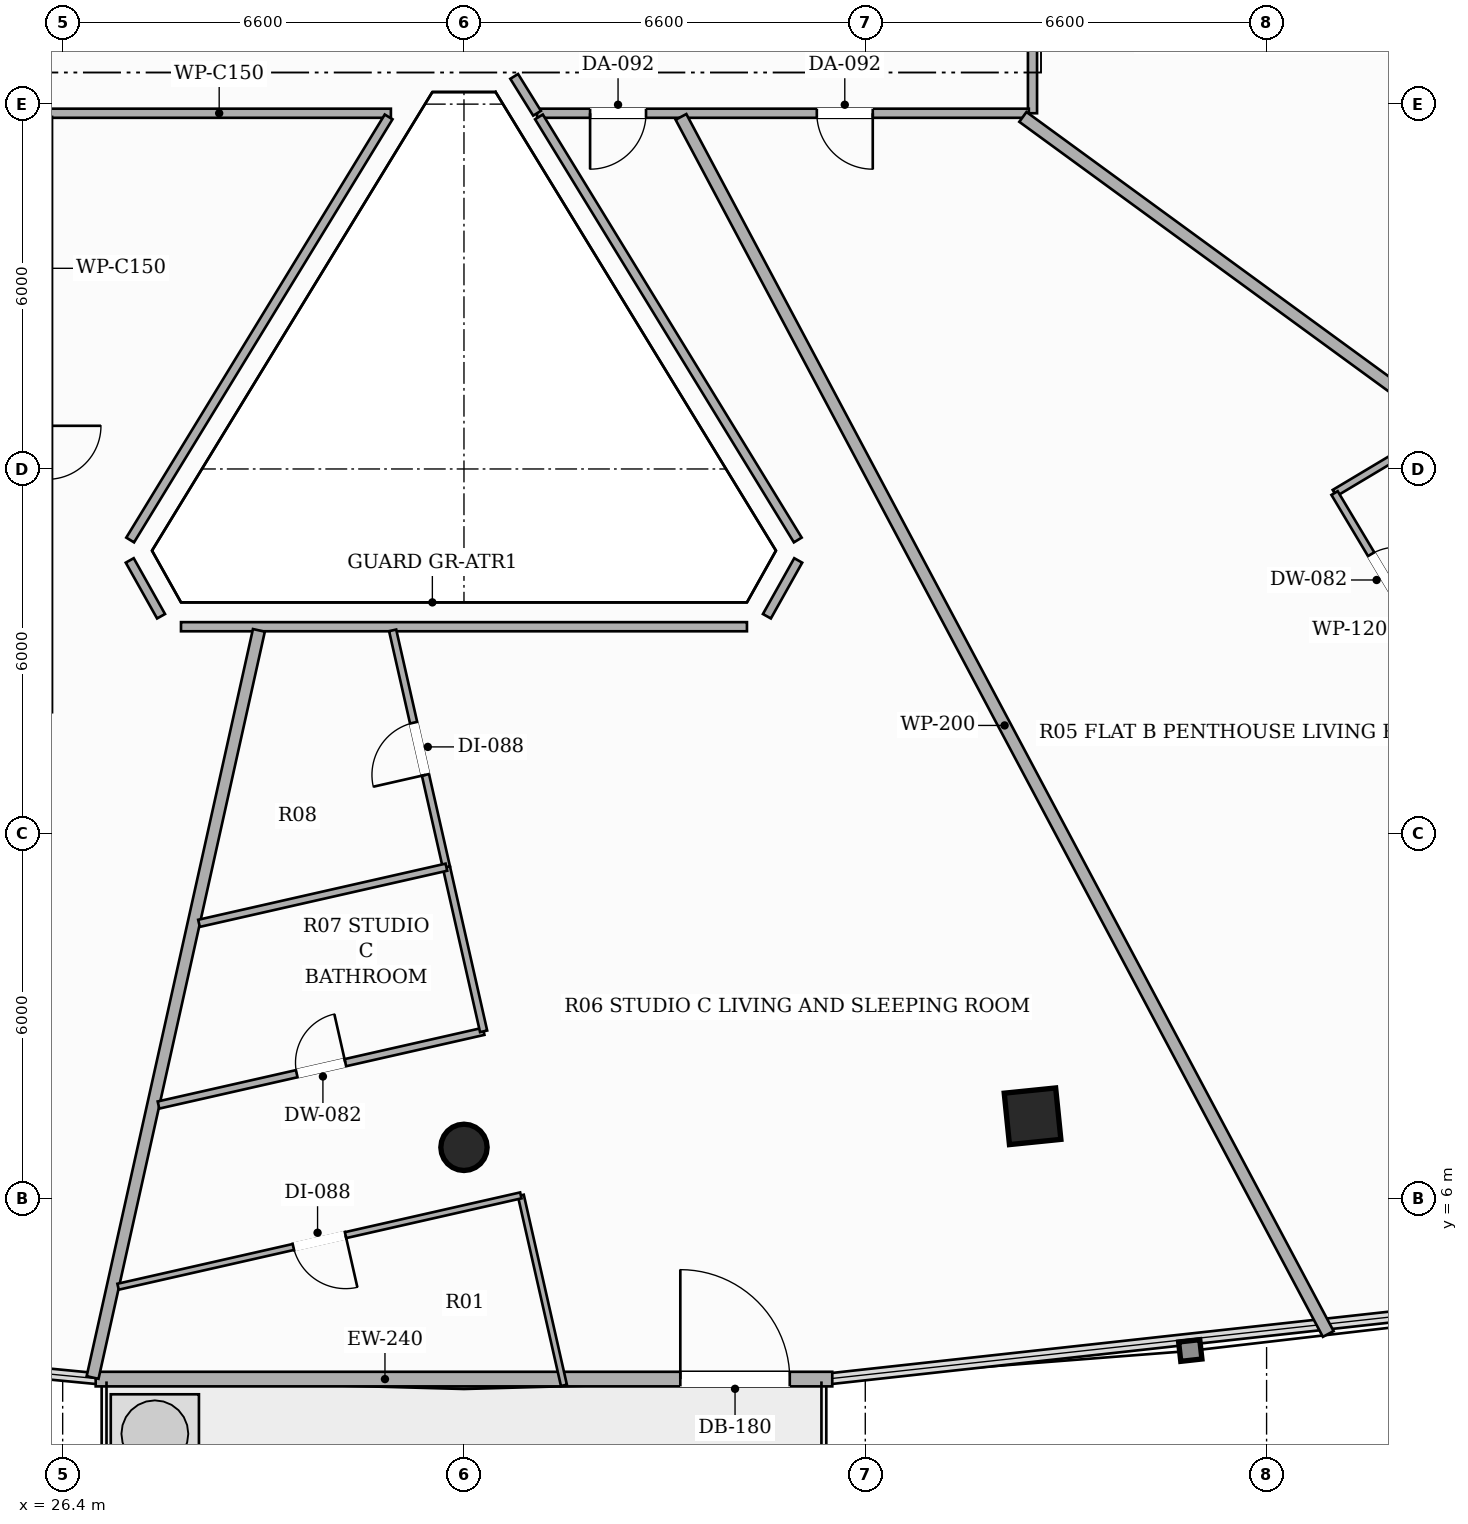
"""IFC4 building model, lengths in metres.
Left out: names, types, materials, properties, quantities, classifications, styles, units other than length and angle.
Written with IfcOpenShell. Run it as: python <this file> out.ifc"""

import sys

from ifc_helpers import new_model, si_unit, direction, frame, frame_2d, origin, origin_2d, place, context, subcontext, project, spatial, rectangle, hollow_rectangle, hollow_circle, extrude, element, fill, save


model = new_model("IFC4")
c1 = context("Model", 3, precision=1e-05, world=origin(), true_north=direction((0.0, 1.0)))
c2 = subcontext(c1, "Body", "Model", "MODEL_VIEW")
j1 = project(units=[si_unit("LENGTHUNIT", "METRE"), si_unit("PLANEANGLEUNIT", "RADIAN")], contexts=[c1])
p1 = place(None, origin())
s1 = spatial("IfcSite", under=j1, at=p1, CompositionType="ELEMENT")
p2 = place(p1, origin())
s2 = spatial("IfcBuilding", under=s1, at=p2, CompositionType="ELEMENT")
p3 = place(p2, frame((0.0, 0.0, 119.9)))
s3 = spatial("IfcBuildingStorey", under=s2, at=p3, CompositionType="ELEMENT", Elevation=119.9)
p4 = place(p3, frame((33.0, 6.844, 0.0), z_axis=(0.0, 0.0, 1.0), x_axis=(1.0, 0.0, 0.0)))
e1 = element("IfcColumn", 1, at=p4, inside=s3, PredefinedType="COLUMN", context=c2, shape_type="SweptSolid", body=[
    extrude(hollow_circle(Radius=0.381, WallThickness=0.022, at=origin_2d()), origin(), (0.0, 0.0, 1.0), 3.3),
])
p5 = place(p3, frame((42.351, 7.355, 0.0), z_axis=(0.0, 0.0, 1.0), x_axis=(0.994880708829, 0.101056297183, 0.0)))
e2 = element("IfcColumn", 2, at=p5, inside=s3, PredefinedType="COLUMN", context=c2, shape_type="SweptSolid", body=[
    extrude(hollow_rectangle(XDim=0.85, YDim=0.85, WallThickness=0.028, at=origin_2d()), origin(), (0.0, 0.0, 1.0), 3.3),
])
p6 = place(p3, frame((26.943, 3.033, 0.0), z_axis=(0.0, 0.0, 1.0), x_axis=(1.0, 0.0, 0.0)))
e3 = element("IfcWall", 3, at=p6, inside=s3, PredefinedType="SOLIDWALL", context=c2, shape_type="SweptSolid", body=[
    extrude(rectangle(XDim=12.114, YDim=0.24, at=frame_2d((6.057, 0.0))), origin(), (0.0, 0.0, 1.0), 2.624),
])
p7 = place(p6, frame((9.615, 0.0, 0.0)))
e4 = element("IfcOpeningElement", 4, at=p7, cuts=e3, PredefinedType="OPENING", context=c2, shape_type="SweptSolid", body=[
    extrude(rectangle(XDim=1.8, YDim=2.2, at=frame_2d((0.9, 1.1))), frame((0.0, 0.13, 0.0), z_axis=(0.0, -1.0, 0.0), x_axis=(1.0, 0.0, 0.0)), (0.0, 0.0, 1.0), 0.26),
])
p8 = place(p3, frame((31.798, 23.85, 0.0), z_axis=(0.0, 0.0, 1.0), x_axis=(-1.0, 0.0, 0.0)))
e5 = element("IfcWall", 5, at=p8, inside=s3, PredefinedType="PARTITIONING", context=c2, shape_type="SweptSolid", body=[
    extrude(rectangle(XDim=5.648, YDim=0.15, at=frame_2d((2.824, 0.0))), origin(), (0.0, 0.0, 1.0), 2.721),
])
p9 = place(p3, frame((26.15, 23.79, 0.0), z_axis=(0.0, 0.0, 1.0), x_axis=(0.0, -1.0, 0.0)))
e6 = element("IfcWall", 6, at=p9, inside=s3, PredefinedType="PARTITIONING", context=c2, shape_type="SweptSolid", body=[
    extrude(rectangle(XDim=9.79, YDim=0.15, at=frame_2d((4.895, 0.0))), origin(), (0.0, 0.0, 1.0), 2.721),
])
p10 = place(p9, frame((5.08, 0.0, 0.0)))
e7 = element("IfcOpeningElement", 7, at=p10, cuts=e6, PredefinedType="OPENING", context=c2, shape_type="SweptSolid", body=[
    extrude(rectangle(XDim=0.88, YDim=2.1, at=frame_2d((0.44, 1.05))), frame((0.0, 0.085, 0.0), z_axis=(0.0, -1.0, 0.0), x_axis=(1.0, 0.0, 0.0)), (0.0, 0.0, 1.0), 0.17),
])
p11 = place(p3, frame((42.35, 28.34, 0.0), z_axis=(0.0, 0.0, 1.0), x_axis=(0.0, -1.0, 0.0)))
e8 = element("IfcWall", 8, at=p11, inside=s3, PredefinedType="PARTITIONING", context=c2, shape_type="SweptSolid", body=[
    extrude(rectangle(XDim=4.49, YDim=0.15, at=frame_2d((2.245, 0.0))), origin(), (0.0, 0.0, 1.0), 2.721),
])
p12 = place(p11, frame((1.805, 0.0, 0.0)))
e9 = element("IfcOpeningElement", 9, at=p12, cuts=e8, PredefinedType="OPENING", context=c2, shape_type="SweptSolid", body=[
    extrude(rectangle(XDim=0.88, YDim=2.1, at=frame_2d((0.44, 1.05))), frame((0.0, 0.085, 0.0), z_axis=(0.0, -1.0, 0.0), x_axis=(1.0, 0.0, 0.0)), (0.0, 0.0, 1.0), 0.17),
])
p13 = place(p3, frame((42.29, 23.85, 0.0), z_axis=(0.0, 0.0, 1.0), x_axis=(-1.0, 0.0, 0.0)))
e10 = element("IfcWall", 10, at=p13, inside=s3, PredefinedType="PARTITIONING", context=c2, shape_type="SweptSolid", body=[
    extrude(rectangle(XDim=8.088, YDim=0.15, at=frame_2d((4.044, 0.0))), origin(), (0.0, 0.0, 1.0), 2.492),
])
p14 = place(p13, frame((2.567, 0.0, 0.0)))
e11 = element("IfcOpeningElement", 11, at=p14, cuts=e10, PredefinedType="OPENING", context=c2, shape_type="SweptSolid", body=[
    extrude(rectangle(XDim=0.92, YDim=2.15, at=frame_2d((0.46, 1.075))), frame((0.0, 0.085, 0.0), z_axis=(0.0, -1.0, 0.0), x_axis=(1.0, 0.0, 0.0)), (0.0, 0.0, 1.0), 0.17),
])
p15 = place(p13, frame((6.296, 0.0, 0.0)))
e12 = element("IfcOpeningElement", 12, at=p15, cuts=e10, PredefinedType="OPENING", context=c2, shape_type="SweptSolid", body=[
    extrude(rectangle(XDim=0.92, YDim=2.15, at=frame_2d((0.46, 1.075))), frame((0.0, 0.085, 0.0), z_axis=(0.0, -1.0, 0.0), x_axis=(1.0, 0.0, 0.0)), (0.0, 0.0, 1.0), 0.17),
])
p16 = place(p3, frame((34.202, 23.85, 0.0), z_axis=(0.0, 0.0, 1.0), x_axis=(-0.527226500772, 0.849724788907, 0.0)))
e13 = element("IfcWall", 13, at=p16, inside=s3, PredefinedType="PARTITIONING", context=c2, shape_type="SweptSolid", body=[
    extrude(rectangle(XDim=0.713, YDim=0.15, at=frame_2d((0.356, 0.0))), origin(), (0.0, 0.0, 1.0), 3.06),
])
p17 = place(p3, frame((34.233, 23.79, 0.0), z_axis=(0.0, 0.0, 1.0), x_axis=(0.521893040745, -0.853010934292, 0.0)))
e14 = element("IfcWall", 14, at=p17, inside=s3, PredefinedType="PARTITIONING", context=c2, shape_type="SweptSolid", body=[
    extrude(rectangle(XDim=8.157, YDim=0.15, at=frame_2d((4.079, 0.0))), origin(), (0.0, 0.0, 1.0), 2.721),
])
p18 = place(p3, frame((38.497, 16.496, 0.0), z_axis=(0.0, 0.0, 1.0), x_axis=(-0.489281087794, -0.872126147485, 0.0)))
e15 = element("IfcWall", 15, at=p18, inside=s3, PredefinedType="PARTITIONING", context=c2, shape_type="SweptSolid", body=[
    extrude(rectangle(XDim=1.053, YDim=0.15, at=frame_2d((0.526, 0.0))), origin(), (0.0, 0.0, 1.0), 3.06),
])
p19 = place(p3, frame((37.654, 15.406, 0.0), z_axis=(0.0, 0.0, 1.0), x_axis=(-1.0, 0.0, 0.0)))
e16 = element("IfcWall", 16, at=p19, inside=s3, PredefinedType="PARTITIONING", context=c2, shape_type="SweptSolid", body=[
    extrude(rectangle(XDim=9.308, YDim=0.15, at=frame_2d((4.654, 0.0))), origin(), (0.0, 0.0, 1.0), 2.721),
])
p20 = place(p3, frame((28.018, 15.578, 0.0), z_axis=(0.0, 0.0, 1.0), x_axis=(-0.489281087794, 0.872126147485, 0.0)))
e17 = element("IfcWall", 17, at=p20, inside=s3, PredefinedType="PARTITIONING", context=c2, shape_type="SweptSolid", body=[
    extrude(rectangle(XDim=1.053, YDim=0.15, at=frame_2d((0.526, 0.0))), origin(), (0.0, 0.0, 1.0), 3.06),
])
p21 = place(p3, frame((27.51, 16.832, 0.0), z_axis=(0.0, 0.0, 1.0), x_axis=(0.521348270591, 0.853343999072, 0.0)))
e18 = element("IfcWall", 18, at=p21, inside=s3, PredefinedType="PARTITIONING", context=c2, shape_type="SweptSolid", body=[
    extrude(rectangle(XDim=8.154, YDim=0.15, at=frame_2d((4.077, 0.0))), origin(), (0.0, 0.0, 1.0), 2.721),
])
p22 = place(p3, frame((47.214, 3.775, 0.0), z_axis=(0.0, 0.0, 1.0), x_axis=(-0.469567249912, 0.88289670846, 0.0)))
e19 = element("IfcWall", 19, at=p22, inside=s3, PredefinedType="PARTITIONING", context=c2, shape_type="SweptSolid", body=[
    extrude(rectangle(XDim=22.67, YDim=0.2, at=frame_2d((11.335, 0.0))), origin(), (0.0, 0.0, 1.0), 2.413),
])
p23 = place(p3, frame((42.192, 23.79, 0.0), z_axis=(0.0, 0.0, 1.0), x_axis=(0.807710254014, -0.589579634621, 0.0)))
e20 = element("IfcWall", 20, at=p23, inside=s3, PredefinedType="PARTITIONING", context=c2, shape_type="SweptSolid", body=[
    extrude(rectangle(XDim=18.691, YDim=0.2, at=frame_2d((9.346, 0.0))), origin(), (0.0, 0.0, 1.0), 2.413),
])
p24 = place(p3, frame((26.892, 3.059, 0.0), z_axis=(0.0, 0.0, 1.0), x_axis=(0.217267240277, 0.97611215867, 0.0)))
e21 = element("IfcWall", 21, at=p24, inside=s3, PredefinedType="PARTITIONING", context=c2, shape_type="SweptSolid", body=[
    extrude(rectangle(XDim=12.588, YDim=0.2, at=frame_2d((6.294, 0.0))), origin(), (0.0, 0.0, 1.0), 2.413),
])
p25 = place(p3, frame((49.08, 18.657, 0.0), z_axis=(0.0, 0.0, 1.0), x_axis=(-0.858394155401, -0.51299071529, 0.0)))
e22 = element("IfcWall", 22, at=p25, inside=s3, PredefinedType="PARTITIONING", context=c2, shape_type="SweptSolid", body=[
    extrude(rectangle(XDim=2.053, YDim=0.12, at=frame_2d((1.026, 0.0))), origin(), (0.0, 0.0, 1.0), 2.721),
])
p26 = place(p3, frame((47.318, 17.604, 0.0), z_axis=(0.0, 0.0, 1.0), x_axis=(0.51313361254, -0.858308741469, 0.0)))
e23 = element("IfcWall", 23, at=p26, inside=s3, PredefinedType="PARTITIONING", context=c2, shape_type="SweptSolid", body=[
    extrude(rectangle(XDim=3.165, YDim=0.12, at=frame_2d((1.582, 0.0))), origin(), (0.0, 0.0, 1.0), 2.492),
])
p27 = place(p26, frame((1.172, 0.0, 0.0)))
e24 = element("IfcOpeningElement", 24, at=p27, cuts=e23, PredefinedType="OPENING", context=c2, shape_type="SweptSolid", body=[
    extrude(rectangle(XDim=0.82, YDim=2.1, at=frame_2d((0.41, 1.05))), frame((0.0, 0.07, 0.0), z_axis=(0.0, -1.0, 0.0), x_axis=(1.0, 0.0, 0.0)), (0.0, 0.0, 1.0), 0.14),
])
p28 = place(p3, frame((27.976, 7.54, 0.0), z_axis=(0.0, 0.0, 1.0), x_axis=(0.975262605336, 0.221049430295, 0.0)))
e25 = element("IfcWall", 25, at=p28, inside=s3, PredefinedType="PARTITIONING", context=c2, shape_type="SweptSolid", body=[
    extrude(rectangle(XDim=5.483, YDim=0.12, at=frame_2d((2.741, 0.0))), origin(), (0.0, 0.0, 1.0), 2.413),
])
p29 = place(p28, frame((2.331, 0.0, 0.0)))
e26 = element("IfcOpeningElement", 26, at=p29, cuts=e25, PredefinedType="OPENING", context=c2, shape_type="SweptSolid", body=[
    extrude(rectangle(XDim=0.82, YDim=2.1, at=frame_2d((0.41, 1.05))), frame((0.0, 0.07, 0.0), z_axis=(0.0, -1.0, 0.0), x_axis=(1.0, 0.0, 0.0)), (0.0, 0.0, 1.0), 0.14),
])
p30 = place(p3, frame((33.323, 8.752, 0.0), z_axis=(0.0, 0.0, 1.0), x_axis=(-0.221159716637, 0.975237601683, 0.0)))
e27 = element("IfcWall", 27, at=p30, inside=s3, PredefinedType="PARTITIONING", context=c2, shape_type="SweptSolid", body=[
    extrude(rectangle(XDim=2.768, YDim=0.12, at=frame_2d((1.384, 0.0))), origin(), (0.0, 0.0, 1.0), 2.721),
])
p31 = place(p3, frame((32.711, 11.451, 0.0), z_axis=(0.0, 0.0, 1.0), x_axis=(-0.221335761288, 0.975197662413, 0.0)))
e28 = element("IfcWall", 28, at=p31, inside=s3, PredefinedType="PARTITIONING", context=c2, shape_type="SweptSolid", body=[
    extrude(rectangle(XDim=3.994, YDim=0.12, at=frame_2d((1.997, 0.0))), origin(), (0.0, 0.0, 1.0), 2.721),
])
p32 = place(p31, frame((1.557, 0.0, 0.0)))
e29 = element("IfcOpeningElement", 29, at=p32, cuts=e28, PredefinedType="OPENING", context=c2, shape_type="SweptSolid", body=[
    extrude(rectangle(XDim=0.88, YDim=2.1, at=frame_2d((0.44, 1.05))), frame((0.0, 0.07, 0.0), z_axis=(0.0, -1.0, 0.0), x_axis=(1.0, 0.0, 0.0)), (0.0, 0.0, 1.0), 0.14),
])
p33 = place(p3, frame((34.644, 2.93, 0.0), z_axis=(0.0, 0.0, 1.0), x_axis=(-0.22131804383, 0.975201683487, 0.0)))
e30 = element("IfcWall", 30, at=p33, inside=s3, PredefinedType="PARTITIONING", context=c2, shape_type="SweptSolid", body=[
    extrude(rectangle(XDim=3.203, YDim=0.1, at=frame_2d((1.602, 0.0))), origin(), (0.0, 0.0, 1.0), 3.06),
])
p34 = place(p3, frame((33.935, 6.054, 0.0), z_axis=(0.0, 0.0, 1.0), x_axis=(-0.975244308244, -0.221130140952, 0.0)))
e31 = element("IfcWall", 31, at=p34, inside=s3, PredefinedType="PARTITIONING", context=c2, shape_type="SweptSolid", body=[
    extrude(rectangle(XDim=6.792, YDim=0.1, at=frame_2d((3.396, 0.0))), origin(), (0.0, 0.0, 1.0), 3.06),
])
p35 = place(p34, frame((2.956, 0.0, 0.0)))
e32 = element("IfcOpeningElement", 32, at=p35, cuts=e31, PredefinedType="OPENING", context=c2, shape_type="SweptSolid", body=[
    extrude(rectangle(XDim=0.88, YDim=2.1, at=frame_2d((0.44, 1.05))), frame((0.0, 0.06, 0.0), z_axis=(0.0, -1.0, 0.0), x_axis=(1.0, 0.0, 0.0)), (0.0, 0.0, 1.0), 0.12),
])
p36 = place(p3, frame((28.642, 10.528, 0.0), z_axis=(0.0, 0.0, 1.0), x_axis=(0.975230479555, 0.221191120408, 0.0)))
e33 = element("IfcWall", 33, at=p36, inside=s3, PredefinedType="PARTITIONING", context=c2, shape_type="SweptSolid", body=[
    extrude(rectangle(XDim=4.172, YDim=0.12, at=frame_2d((2.086, 0.0))), origin(), (0.0, 0.0, 1.0), 2.721),
])
p37 = place(p7, origin())
e34 = element("IfcDoor", 34, at=p37, inside=s3, OperationType="SINGLE_SWING_LEFT", PredefinedType="DOOR", context=c2, shape_type="SweptSolid", body=[
    extrude(rectangle(XDim=1.8, YDim=2.2, at=frame_2d((0.9, 1.1))), frame((0.0, 0.025, 0.0), z_axis=(0.0, -1.0, 0.0), x_axis=(1.0, 0.0, 0.0)), (0.0, 0.0, 1.0), 0.05),
])
fill(e4, e34)
p38 = place(p14, origin())
e35 = element("IfcDoor", 35, at=p38, inside=s3, OperationType="SINGLE_SWING_LEFT", PredefinedType="DOOR", context=c2, shape_type="SweptSolid", body=[
    extrude(rectangle(XDim=0.92, YDim=2.15, at=frame_2d((0.46, 1.075))), frame((0.0, 0.025, 0.0), z_axis=(0.0, -1.0, 0.0), x_axis=(1.0, 0.0, 0.0)), (0.0, 0.0, 1.0), 0.05),
])
fill(e11, e35)
p39 = place(p27, origin())
e36 = element("IfcDoor", 36, at=p39, inside=s3, OperationType="SINGLE_SWING_RIGHT", PredefinedType="DOOR", context=c2, shape_type="SweptSolid", body=[
    extrude(rectangle(XDim=0.82, YDim=2.1, at=frame_2d((0.41, 1.05))), frame((0.0, 0.025, 0.0), z_axis=(0.0, -1.0, 0.0), x_axis=(1.0, 0.0, 0.0)), (0.0, 0.0, 1.0), 0.05),
])
fill(e24, e36)
p40 = place(p15, origin())
e37 = element("IfcDoor", 37, at=p40, inside=s3, OperationType="SINGLE_SWING_RIGHT", PredefinedType="DOOR", context=c2, shape_type="SweptSolid", body=[
    extrude(rectangle(XDim=0.92, YDim=2.15, at=frame_2d((0.46, 1.075))), frame((0.0, 0.025, 0.0), z_axis=(0.0, -1.0, 0.0), x_axis=(1.0, 0.0, 0.0)), (0.0, 0.0, 1.0), 0.05),
])
fill(e12, e37)
p41 = place(p29, origin())
e38 = element("IfcDoor", 38, at=p41, inside=s3, OperationType="SINGLE_SWING_RIGHT", PredefinedType="DOOR", context=c2, shape_type="SweptSolid", body=[
    extrude(rectangle(XDim=0.82, YDim=2.1, at=frame_2d((0.41, 1.05))), frame((0.0, 0.025, 0.0), z_axis=(0.0, -1.0, 0.0), x_axis=(1.0, 0.0, 0.0)), (0.0, 0.0, 1.0), 0.05),
])
fill(e26, e38)
p42 = place(p32, origin())
e39 = element("IfcDoor", 39, at=p42, inside=s3, OperationType="SINGLE_SWING_LEFT", PredefinedType="DOOR", context=c2, shape_type="SweptSolid", body=[
    extrude(rectangle(XDim=0.88, YDim=2.1, at=frame_2d((0.44, 1.05))), frame((0.0, 0.025, 0.0), z_axis=(0.0, -1.0, 0.0), x_axis=(1.0, 0.0, 0.0)), (0.0, 0.0, 1.0), 0.05),
])
fill(e29, e39)
p43 = place(p35, origin())
e40 = element("IfcDoor", 40, at=p43, inside=s3, OperationType="SINGLE_SWING_LEFT", PredefinedType="DOOR", context=c2, shape_type="SweptSolid", body=[
    extrude(rectangle(XDim=0.88, YDim=2.1, at=frame_2d((0.44, 1.05))), frame((0.0, 0.025, 0.0), z_axis=(0.0, -1.0, 0.0), x_axis=(1.0, 0.0, 0.0)), (0.0, 0.0, 1.0), 0.05),
])
fill(e32, e40)
save(model, sys.argv[1])
